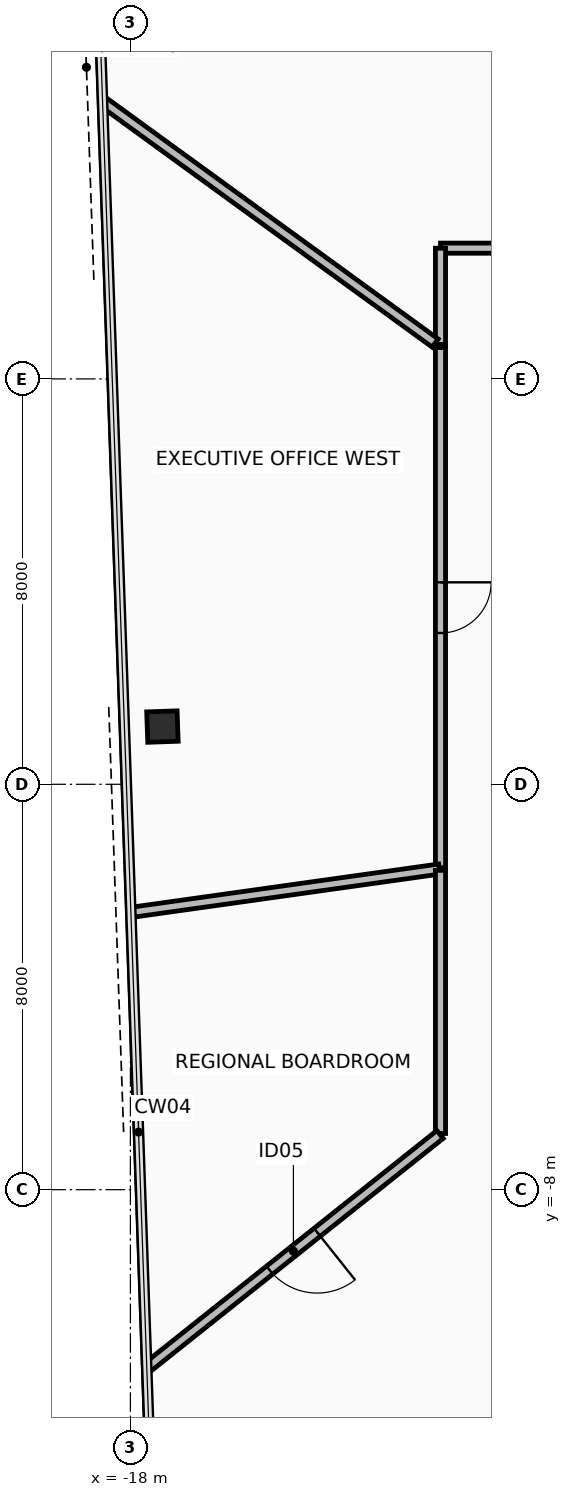
"""IFC4 building model, lengths in metres.
Left out: names, types, materials, properties, quantities, classifications, styles, units other than length and angle.
Written with IfcOpenShell. Run it as: python <this file> out.ifc"""

import sys

from ifc_helpers import new_model, si_unit, direction, frame, frame_2d, origin, origin_2d, place, context, subcontext, project, spatial, rectangle, hollow_rectangle, extrude, element, fill, save


model = new_model("IFC4")
c1 = context("Model", 3, precision=1e-05, world=origin(), true_north=direction((0.0, 1.0)))
c2 = subcontext(c1, "Body", "Model", "MODEL_VIEW")
j1 = project(units=[si_unit("LENGTHUNIT", "METRE"), si_unit("PLANEANGLEUNIT", "RADIAN")], contexts=[c1])
p1 = place(None, origin())
s1 = spatial("IfcSite", under=j1, at=p1, CompositionType="ELEMENT")
p2 = place(p1, origin())
s2 = spatial("IfcBuilding", under=s1, at=p2, CompositionType="ELEMENT")
p3 = place(p2, frame((0.0, 0.0, 146.0)))
s3 = spatial("IfcBuildingStorey", under=s2, at=p3, CompositionType="ELEMENT", Elevation=146.0)
p4 = place(p3, frame((-17.368, 1.139, 0.0), z_axis=(0.0, 0.0, 1.0), x_axis=(-0.034899496703, 0.999390827019, 0.0)))
e1 = element("IfcColumn", 1, at=p4, inside=s3, PredefinedType="COLUMN", context=c2, shape_type="SweptSolid", body=[
    extrude(hollow_rectangle(XDim=0.6, YDim=0.6, WallThickness=0.036, at=origin_2d()), origin(), (0.0, 0.0, 1.0), 3.6),
])
p5 = place(p3, frame((-2.746, 10.58, 0.0), z_axis=(0.0, 0.0, 1.0), x_axis=(-1.0, 0.0, 0.0)))
e2 = element("IfcWall", 2, at=p5, inside=s3, PredefinedType="PARTITIONING", context=c2, shape_type="SweptSolid", body=[
    extrude(rectangle(XDim=9.133, YDim=0.2, at=frame_2d((4.567, 0.0))), origin(), (0.0, 0.0, 1.0), 2.755),
])
p6 = place(p5, frame((4.067, 0.0, 0.0)))
e3 = element("IfcOpeningElement", 3, at=p6, cuts=e2, PredefinedType="OPENING", context=c2, shape_type="SweptSolid", body=[
    extrude(rectangle(XDim=1.0, YDim=2.15, at=frame_2d((0.5, 1.075))), frame((0.0, 0.11, 0.0), z_axis=(0.0, -1.0, 0.0), x_axis=(1.0, 0.0, 0.0)), (0.0, 0.0, 1.0), 0.22),
])
p7 = place(p3, frame((-11.88, 10.579, 0.0), z_axis=(0.0, 0.0, 1.0), x_axis=(0.0, -1.0, 0.0)))
e4 = element("IfcWall", 4, at=p7, inside=s3, PredefinedType="PARTITIONING", context=c2, shape_type="SweptSolid", body=[
    extrude(rectangle(XDim=1.899, YDim=0.2, at=frame_2d((0.949, 0.0))), origin(), (0.0, 0.0, 1.0), 2.855),
])
p8 = place(p3, frame((-11.985, 8.708, 0.0), z_axis=(0.0, 0.0, 1.0), x_axis=(-0.80901356524, 0.587789972063, 0.0)))
e5 = element("IfcWall", 5, at=p8, inside=s3, PredefinedType="PARTITIONING", context=c2, shape_type="SweptSolid", body=[
    extrude(rectangle(XDim=8.102, YDim=0.2, at=frame_2d((4.051, 0.0))), origin(), (0.0, 0.0, 1.0), 2.705),
])
p9 = place(p3, frame((-11.88, 8.619, 0.0), z_axis=(0.0, 0.0, 1.0), x_axis=(0.0, -1.0, 0.0)))
e6 = element("IfcWall", 6, at=p9, inside=s3, PredefinedType="PARTITIONING", context=c2, shape_type="SweptSolid", body=[
    extrude(rectangle(XDim=10.267, YDim=0.2, at=frame_2d((5.133, 0.0))), origin(), (0.0, 0.0, 1.0), 2.855),
])
p10 = place(p9, frame((4.633, 0.0, 0.0)))
e7 = element("IfcOpeningElement", 7, at=p10, cuts=e6, PredefinedType="OPENING", context=c2, shape_type="SweptSolid", body=[
    extrude(rectangle(XDim=1.0, YDim=2.15, at=frame_2d((0.5, 1.075))), frame((0.0, 0.11, 0.0), z_axis=(0.0, -1.0, 0.0), x_axis=(1.0, 0.0, 0.0)), (0.0, 0.0, 1.0), 0.22),
])
p11 = place(p3, frame((-11.902, -1.673, 0.0), z_axis=(0.0, 0.0, 1.0), x_axis=(-0.990268435755, -0.139170489501, 0.0)))
e8 = element("IfcWall", 8, at=p11, inside=s3, PredefinedType="PARTITIONING", context=c2, shape_type="SweptSolid", body=[
    extrude(rectangle(XDim=6.121, YDim=0.2, at=frame_2d((3.06, 0.0))), origin(), (0.0, 0.0, 1.0), 2.705),
])
p12 = place(p3, frame((-11.88, -1.698, 0.0), z_axis=(0.0, 0.0, 1.0), x_axis=(0.0, -1.0, 0.0)))
e9 = element("IfcWall", 9, at=p12, inside=s3, PredefinedType="PARTITIONING", context=c2, shape_type="SweptSolid", body=[
    extrude(rectangle(XDim=5.193, YDim=0.2, at=frame_2d((2.596, 0.0))), origin(), (0.0, 0.0, 1.0), 3.41),
])
p13 = place(p3, frame((-11.889, -6.911, 0.0), z_axis=(0.0, 0.0, 1.0), x_axis=(-0.782386471956, -0.622793230936, 0.0)))
e10 = element("IfcWall", 10, at=p13, inside=s3, PredefinedType="PARTITIONING", context=c2, shape_type="SweptSolid", body=[
    extrude(rectangle(XDim=7.396, YDim=0.2, at=frame_2d((3.698, 0.0))), origin(), (0.0, 0.0, 1.0), 2.705),
])
p14 = place(p13, frame((3.098, 0.0, 0.0)))
e11 = element("IfcOpeningElement", 11, at=p14, cuts=e10, PredefinedType="OPENING", context=c2, shape_type="SweptSolid", body=[
    extrude(rectangle(XDim=1.2, YDim=2.15, at=frame_2d((0.6, 1.075))), frame((0.0, 0.11, 0.0), z_axis=(0.0, -1.0, 0.0), x_axis=(1.0, 0.0, 0.0)), (0.0, 0.0, 1.0), 0.22),
])
p15 = place(p3, frame((-17.299, -22.142, 0.0), z_axis=(0.0, 0.0, 1.0), x_axis=(0.615665047481, 0.78800796272, 0.0)))
e12 = element("IfcWall", 12, at=p15, inside=s3, PredefinedType="PARTITIONING", context=c2, shape_type="SweptSolid", body=[
    extrude(rectangle(XDim=14.66, YDim=0.2, at=frame_2d((7.33, 0.0))), origin(), (0.0, 0.0, 1.0), 2.705),
])
p16 = place(p10, origin())
e13 = element("IfcDoor", 13, at=p16, inside=s3, OperationType="SINGLE_SWING_RIGHT", PredefinedType="DOOR", context=c2, shape_type="SweptSolid", body=[
    extrude(rectangle(XDim=1.0, YDim=2.15, at=frame_2d((0.5, 1.075))), frame((0.0, 0.025, 0.0), z_axis=(0.0, -1.0, 0.0), x_axis=(1.0, 0.0, 0.0)), (0.0, 0.0, 1.0), 0.05),
])
fill(e7, e13)
p17 = place(p14, origin())
e14 = element("IfcDoor", 14, at=p17, inside=s3, OperationType="SINGLE_SWING_LEFT", PredefinedType="DOOR", context=c2, shape_type="SweptSolid", body=[
    extrude(rectangle(XDim=1.2, YDim=2.15, at=frame_2d((0.6, 1.075))), frame((0.0, 0.025, 0.0), z_axis=(0.0, -1.0, 0.0), x_axis=(1.0, 0.0, 0.0)), (0.0, 0.0, 1.0), 0.05),
])
fill(e11, e14)
save(model, sys.argv[1])
